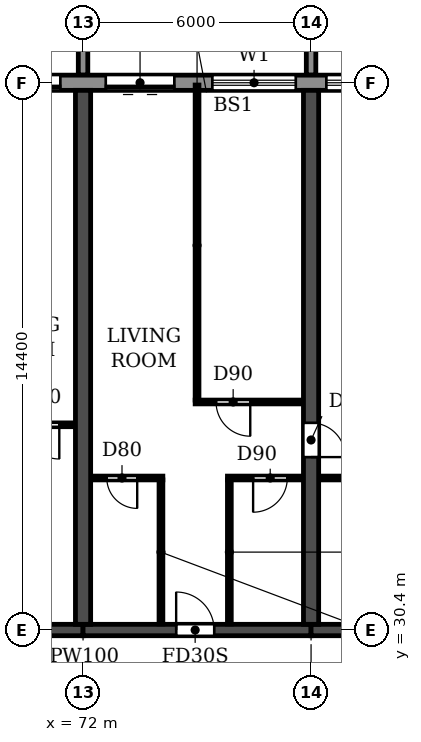
"""IFC4 building model, lengths in metres.
Left out: names, types, materials, properties, quantities, classifications, styles, units other than length and angle.
Written with IfcOpenShell. Run it as: python <this file> out.ifc"""

import sys

from ifc_helpers import new_model, si_unit, direction, frame, frame_2d, origin, place, context, subcontext, project, spatial, polyline, rectangle, outline, extrude, source, transform, mapped, element, fill, save


model = new_model("IFC4")
c1 = context("Model", 3, precision=1e-05, world=origin(), true_north=direction((0.0, 1.0)))
c2 = subcontext(c1, "Body", "Model", "MODEL_VIEW")
j1 = project(units=[si_unit("LENGTHUNIT", "METRE"), si_unit("PLANEANGLEUNIT", "RADIAN")], contexts=[c1])
p1 = place(None, origin())
s1 = spatial("IfcSite", under=j1, at=p1, CompositionType="ELEMENT")
p2 = place(p1, origin())
s2 = spatial("IfcBuilding", under=s1, at=p2, CompositionType="ELEMENT")
p3 = place(p2, frame((0.0, 0.0, 49.8)))
s3 = spatial("IfcBuildingStorey", under=s2, at=p3, CompositionType="ELEMENT", Elevation=49.8)
p4 = place(p3, frame((72.0, 30.55, 0.0), z_axis=(0.0, 0.0, 1.0), x_axis=(0.0, 1.0, 0.0)))
e1 = element("IfcWall", 1, at=p4, inside=s3, PredefinedType="SHEAR", context=c2, shape_type="SweptSolid", body=[
    extrude(rectangle(XDim=14.05, YDim=0.4, at=frame_2d((7.025, 0.0))), origin(), (0.0, 0.0, 1.0), 3.0),
])
p5 = place(p3, frame((78.0, 30.55, 0.0), z_axis=(0.0, 0.0, 1.0), x_axis=(0.0, 1.0, 0.0)))
e2 = element("IfcWall", 2, at=p5, inside=s3, PredefinedType="SHEAR", context=c2, shape_type="SweptSolid", body=[
    extrude(rectangle(XDim=14.05, YDim=0.4, at=frame_2d((7.025, 0.0))), origin(), (0.0, 0.0, 1.0), 3.0),
])
p6 = place(p5, frame((4.4, 0.0, 0.0)))
e3 = element("IfcOpeningElement", 3, at=p6, cuts=e2, PredefinedType="OPENING", context=c2, shape_type="SweptSolid", body=[
    extrude(rectangle(XDim=0.9, YDim=2.1, at=frame_2d((0.45, 1.05))), frame((0.0, 0.21, 0.0), z_axis=(0.0, -1.0, 0.0), x_axis=(1.0, 0.0, 0.0)), (0.0, 0.0, 1.0), 0.42),
])
p7 = place(p3, frame((66.0, 30.4, 0.0), z_axis=(0.0, 0.0, 1.0), x_axis=(1.0, 0.0, 0.0)))
e4 = element("IfcWall", 4, at=p7, inside=s3, PredefinedType="SHEAR", context=c2, shape_type="SweptSolid", body=[
    extrude(rectangle(XDim=6.0, YDim=0.3, at=frame_2d((3.0, 0.0))), origin(), (0.0, 0.0, 1.0), 2.4),
])
p8 = place(p7, frame((2.45, 0.0, 0.0)))
e5 = element("IfcOpeningElement", 5, at=p8, cuts=e4, PredefinedType="OPENING", context=c2, shape_type="SweptSolid", body=[
    extrude(rectangle(XDim=1.0, YDim=2.1, at=frame_2d((0.5, 1.05))), frame((0.0, 0.16, 0.0), z_axis=(0.0, -1.0, 0.0), x_axis=(1.0, 0.0, 0.0)), (0.0, 0.0, 1.0), 0.32),
])
p9 = place(p3, frame((72.0, 30.4, 0.0), z_axis=(0.0, 0.0, 1.0), x_axis=(1.0, 0.0, 0.0)))
e6 = element("IfcWall", 6, at=p9, inside=s3, PredefinedType="SHEAR", context=c2, shape_type="SweptSolid", body=[
    extrude(rectangle(XDim=6.0, YDim=0.3, at=frame_2d((3.0, 0.0))), origin(), (0.0, 0.0, 1.0), 2.4),
])
p10 = place(p9, frame((2.45, 0.0, 0.0)))
e7 = element("IfcOpeningElement", 7, at=p10, cuts=e6, PredefinedType="OPENING", context=c2, shape_type="SweptSolid", body=[
    extrude(rectangle(XDim=1.0, YDim=2.1, at=frame_2d((0.5, 1.05))), frame((0.0, 0.16, 0.0), z_axis=(0.0, -1.0, 0.0), x_axis=(1.0, 0.0, 0.0)), (0.0, 0.0, 1.0), 0.32),
])
p11 = place(p3, frame((78.0, 30.4, 0.0), z_axis=(0.0, 0.0, 1.0), x_axis=(1.0, 0.0, 0.0)))
e8 = element("IfcWall", 8, at=p11, inside=s3, PredefinedType="SHEAR", context=c2, shape_type="SweptSolid", body=[
    extrude(rectangle(XDim=6.0, YDim=0.3, at=frame_2d((3.0, 0.0))), origin(), (0.0, 0.0, 1.0), 2.4),
])
p12 = place(p3, frame((97.317, 44.8, 0.0), z_axis=(0.0, 0.0, 1.0), x_axis=(-1.0, 0.0, 0.0)))
e9 = element("IfcWall", 9, at=p12, inside=s3, PredefinedType="STANDARD", context=c2, shape_type="SweptSolid", body=[
    extrude(rectangle(XDim=92.634, YDim=0.4, at=frame_2d((46.317, 0.0))), origin(), (0.0, 0.0, 1.0), 3.0),
])
p13 = place(p12, frame((88.917, 0.0, 0.0)))
e10 = element("IfcOpeningElement", 10, at=p13, cuts=e9, PredefinedType="OPENING", context=c2, shape_type="SweptSolid", body=[
    extrude(rectangle(XDim=1.8, YDim=2.4, at=frame_2d((0.9, 1.2))), frame((0.0, 0.21, 0.0), z_axis=(0.0, -1.0, 0.0), x_axis=(1.0, 0.0, 0.0)), (0.0, 0.0, 1.0), 0.42),
])
p14 = place(p12, frame((85.717, 0.0, 0.9)))
e11 = element("IfcOpeningElement", 11, at=p14, cuts=e9, PredefinedType="OPENING", context=c2, shape_type="SweptSolid", body=[
    extrude(rectangle(XDim=2.2, YDim=1.5, at=frame_2d((1.1, 0.75))), frame((0.0, 0.21, 0.0), z_axis=(0.0, -1.0, 0.0), x_axis=(1.0, 0.0, 0.0)), (0.0, 0.0, 1.0), 0.42),
])
p15 = place(p12, frame((82.717, 0.0, 0.9)))
e12 = element("IfcOpeningElement", 12, at=p15, cuts=e9, PredefinedType="OPENING", context=c2, shape_type="SweptSolid", body=[
    extrude(rectangle(XDim=2.2, YDim=1.5, at=frame_2d((1.1, 0.75))), frame((0.0, 0.21, 0.0), z_axis=(0.0, -1.0, 0.0), x_axis=(1.0, 0.0, 0.0)), (0.0, 0.0, 1.0), 0.42),
])
p16 = place(p12, frame((79.717, 0.0, 0.9)))
e13 = element("IfcOpeningElement", 13, at=p16, cuts=e9, PredefinedType="OPENING", context=c2, shape_type="SweptSolid", body=[
    extrude(rectangle(XDim=2.2, YDim=1.5, at=frame_2d((1.1, 0.75))), frame((0.0, 0.21, 0.0), z_axis=(0.0, -1.0, 0.0), x_axis=(1.0, 0.0, 0.0)), (0.0, 0.0, 1.0), 0.42),
])
p17 = place(p12, frame((76.717, 0.0, 0.9)))
e14 = element("IfcOpeningElement", 14, at=p17, cuts=e9, PredefinedType="OPENING", context=c2, shape_type="SweptSolid", body=[
    extrude(rectangle(XDim=2.2, YDim=1.5, at=frame_2d((1.1, 0.75))), frame((0.0, 0.21, 0.0), z_axis=(0.0, -1.0, 0.0), x_axis=(1.0, 0.0, 0.0)), (0.0, 0.0, 1.0), 0.42),
])
p18 = place(p12, frame((73.917, 0.0, 0.0)))
e15 = element("IfcOpeningElement", 15, at=p18, cuts=e9, PredefinedType="OPENING", context=c2, shape_type="SweptSolid", body=[
    extrude(rectangle(XDim=1.8, YDim=2.4, at=frame_2d((0.9, 1.2))), frame((0.0, 0.21, 0.0), z_axis=(0.0, -1.0, 0.0), x_axis=(1.0, 0.0, 0.0)), (0.0, 0.0, 1.0), 0.42),
])
p19 = place(p12, frame((70.717, 0.0, 0.9)))
e16 = element("IfcOpeningElement", 16, at=p19, cuts=e9, PredefinedType="OPENING", context=c2, shape_type="SweptSolid", body=[
    extrude(rectangle(XDim=2.2, YDim=1.5, at=frame_2d((1.1, 0.75))), frame((0.0, 0.21, 0.0), z_axis=(0.0, -1.0, 0.0), x_axis=(1.0, 0.0, 0.0)), (0.0, 0.0, 1.0), 0.42),
])
p20 = place(p12, frame((67.717, 0.0, 0.9)))
e17 = element("IfcOpeningElement", 17, at=p20, cuts=e9, PredefinedType="OPENING", context=c2, shape_type="SweptSolid", body=[
    extrude(rectangle(XDim=2.2, YDim=1.5, at=frame_2d((1.1, 0.75))), frame((0.0, 0.21, 0.0), z_axis=(0.0, -1.0, 0.0), x_axis=(1.0, 0.0, 0.0)), (0.0, 0.0, 1.0), 0.42),
])
p21 = place(p12, frame((64.717, 0.0, 0.9)))
e18 = element("IfcOpeningElement", 18, at=p21, cuts=e9, PredefinedType="OPENING", context=c2, shape_type="SweptSolid", body=[
    extrude(rectangle(XDim=2.2, YDim=1.5, at=frame_2d((1.1, 0.75))), frame((0.0, 0.21, 0.0), z_axis=(0.0, -1.0, 0.0), x_axis=(1.0, 0.0, 0.0)), (0.0, 0.0, 1.0), 0.42),
])
p22 = place(p12, frame((61.917, 0.0, 0.0)))
e19 = element("IfcOpeningElement", 19, at=p22, cuts=e9, PredefinedType="OPENING", context=c2, shape_type="SweptSolid", body=[
    extrude(rectangle(XDim=1.8, YDim=2.4, at=frame_2d((0.9, 1.2))), frame((0.0, 0.21, 0.0), z_axis=(0.0, -1.0, 0.0), x_axis=(1.0, 0.0, 0.0)), (0.0, 0.0, 1.0), 0.42),
])
p23 = place(p12, frame((58.717, 0.0, 0.9)))
e20 = element("IfcOpeningElement", 20, at=p23, cuts=e9, PredefinedType="OPENING", context=c2, shape_type="SweptSolid", body=[
    extrude(rectangle(XDim=2.2, YDim=1.5, at=frame_2d((1.1, 0.75))), frame((0.0, 0.21, 0.0), z_axis=(0.0, -1.0, 0.0), x_axis=(1.0, 0.0, 0.0)), (0.0, 0.0, 1.0), 0.42),
])
p24 = place(p12, frame((55.717, 0.0, 0.9)))
e21 = element("IfcOpeningElement", 21, at=p24, cuts=e9, PredefinedType="OPENING", context=c2, shape_type="SweptSolid", body=[
    extrude(rectangle(XDim=2.2, YDim=1.5, at=frame_2d((1.1, 0.75))), frame((0.0, 0.21, 0.0), z_axis=(0.0, -1.0, 0.0), x_axis=(1.0, 0.0, 0.0)), (0.0, 0.0, 1.0), 0.42),
])
p25 = place(p12, frame((52.717, 0.0, 0.9)))
e22 = element("IfcOpeningElement", 22, at=p25, cuts=e9, PredefinedType="OPENING", context=c2, shape_type="SweptSolid", body=[
    extrude(rectangle(XDim=2.2, YDim=1.5, at=frame_2d((1.1, 0.75))), frame((0.0, 0.21, 0.0), z_axis=(0.0, -1.0, 0.0), x_axis=(1.0, 0.0, 0.0)), (0.0, 0.0, 1.0), 0.42),
])
p26 = place(p12, frame((49.917, 0.0, 0.0)))
e23 = element("IfcOpeningElement", 23, at=p26, cuts=e9, PredefinedType="OPENING", context=c2, shape_type="SweptSolid", body=[
    extrude(rectangle(XDim=1.8, YDim=2.4, at=frame_2d((0.9, 1.2))), frame((0.0, 0.21, 0.0), z_axis=(0.0, -1.0, 0.0), x_axis=(1.0, 0.0, 0.0)), (0.0, 0.0, 1.0), 0.42),
])
p27 = place(p12, frame((46.717, 0.0, 0.9)))
e24 = element("IfcOpeningElement", 24, at=p27, cuts=e9, PredefinedType="OPENING", context=c2, shape_type="SweptSolid", body=[
    extrude(rectangle(XDim=2.2, YDim=1.5, at=frame_2d((1.1, 0.75))), frame((0.0, 0.21, 0.0), z_axis=(0.0, -1.0, 0.0), x_axis=(1.0, 0.0, 0.0)), (0.0, 0.0, 1.0), 0.42),
])
p28 = place(p12, frame((43.717, 0.0, 0.9)))
e25 = element("IfcOpeningElement", 25, at=p28, cuts=e9, PredefinedType="OPENING", context=c2, shape_type="SweptSolid", body=[
    extrude(rectangle(XDim=2.2, YDim=1.5, at=frame_2d((1.1, 0.75))), frame((0.0, 0.21, 0.0), z_axis=(0.0, -1.0, 0.0), x_axis=(1.0, 0.0, 0.0)), (0.0, 0.0, 1.0), 0.42),
])
p29 = place(p12, frame((40.717, 0.0, 0.9)))
e26 = element("IfcOpeningElement", 26, at=p29, cuts=e9, PredefinedType="OPENING", context=c2, shape_type="SweptSolid", body=[
    extrude(rectangle(XDim=2.2, YDim=1.5, at=frame_2d((1.1, 0.75))), frame((0.0, 0.21, 0.0), z_axis=(0.0, -1.0, 0.0), x_axis=(1.0, 0.0, 0.0)), (0.0, 0.0, 1.0), 0.42),
])
p30 = place(p12, frame((37.917, 0.0, 0.0)))
e27 = element("IfcOpeningElement", 27, at=p30, cuts=e9, PredefinedType="OPENING", context=c2, shape_type="SweptSolid", body=[
    extrude(rectangle(XDim=1.8, YDim=2.4, at=frame_2d((0.9, 1.2))), frame((0.0, 0.21, 0.0), z_axis=(0.0, -1.0, 0.0), x_axis=(1.0, 0.0, 0.0)), (0.0, 0.0, 1.0), 0.42),
])
p31 = place(p12, frame((34.717, 0.0, 0.9)))
e28 = element("IfcOpeningElement", 28, at=p31, cuts=e9, PredefinedType="OPENING", context=c2, shape_type="SweptSolid", body=[
    extrude(rectangle(XDim=2.2, YDim=1.5, at=frame_2d((1.1, 0.75))), frame((0.0, 0.21, 0.0), z_axis=(0.0, -1.0, 0.0), x_axis=(1.0, 0.0, 0.0)), (0.0, 0.0, 1.0), 0.42),
])
p32 = place(p12, frame((31.717, 0.0, 0.9)))
e29 = element("IfcOpeningElement", 29, at=p32, cuts=e9, PredefinedType="OPENING", context=c2, shape_type="SweptSolid", body=[
    extrude(rectangle(XDim=2.2, YDim=1.5, at=frame_2d((1.1, 0.75))), frame((0.0, 0.21, 0.0), z_axis=(0.0, -1.0, 0.0), x_axis=(1.0, 0.0, 0.0)), (0.0, 0.0, 1.0), 0.42),
])
p33 = place(p12, frame((28.717, 0.0, 0.9)))
e30 = element("IfcOpeningElement", 30, at=p33, cuts=e9, PredefinedType="OPENING", context=c2, shape_type="SweptSolid", body=[
    extrude(rectangle(XDim=2.2, YDim=1.5, at=frame_2d((1.1, 0.75))), frame((0.0, 0.21, 0.0), z_axis=(0.0, -1.0, 0.0), x_axis=(1.0, 0.0, 0.0)), (0.0, 0.0, 1.0), 0.42),
])
p34 = place(p12, frame((25.917, 0.0, 0.0)))
e31 = element("IfcOpeningElement", 31, at=p34, cuts=e9, PredefinedType="OPENING", context=c2, shape_type="SweptSolid", body=[
    extrude(rectangle(XDim=1.8, YDim=2.4, at=frame_2d((0.9, 1.2))), frame((0.0, 0.21, 0.0), z_axis=(0.0, -1.0, 0.0), x_axis=(1.0, 0.0, 0.0)), (0.0, 0.0, 1.0), 0.42),
])
p35 = place(p12, frame((22.917, 0.0, 0.0)))
e32 = element("IfcOpeningElement", 32, at=p35, cuts=e9, PredefinedType="OPENING", context=c2, shape_type="SweptSolid", body=[
    extrude(rectangle(XDim=1.8, YDim=2.4, at=frame_2d((0.9, 1.2))), frame((0.0, 0.21, 0.0), z_axis=(0.0, -1.0, 0.0), x_axis=(1.0, 0.0, 0.0)), (0.0, 0.0, 1.0), 0.42),
])
p36 = place(p12, frame((19.717, 0.0, 0.9)))
e33 = element("IfcOpeningElement", 33, at=p36, cuts=e9, PredefinedType="OPENING", context=c2, shape_type="SweptSolid", body=[
    extrude(rectangle(XDim=2.2, YDim=1.5, at=frame_2d((1.1, 0.75))), frame((0.0, 0.21, 0.0), z_axis=(0.0, -1.0, 0.0), x_axis=(1.0, 0.0, 0.0)), (0.0, 0.0, 1.0), 0.42),
])
p37 = place(p12, frame((16.717, 0.0, 0.9)))
e34 = element("IfcOpeningElement", 34, at=p37, cuts=e9, PredefinedType="OPENING", context=c2, shape_type="SweptSolid", body=[
    extrude(rectangle(XDim=2.2, YDim=1.5, at=frame_2d((1.1, 0.75))), frame((0.0, 0.21, 0.0), z_axis=(0.0, -1.0, 0.0), x_axis=(1.0, 0.0, 0.0)), (0.0, 0.0, 1.0), 0.42),
])
p38 = place(p12, frame((13.717, 0.0, 0.9)))
e35 = element("IfcOpeningElement", 35, at=p38, cuts=e9, PredefinedType="OPENING", context=c2, shape_type="SweptSolid", body=[
    extrude(rectangle(XDim=2.2, YDim=1.5, at=frame_2d((1.1, 0.75))), frame((0.0, 0.21, 0.0), z_axis=(0.0, -1.0, 0.0), x_axis=(1.0, 0.0, 0.0)), (0.0, 0.0, 1.0), 0.42),
])
p39 = place(p12, frame((10.717, 0.0, 0.9)))
e36 = element("IfcOpeningElement", 36, at=p39, cuts=e9, PredefinedType="OPENING", context=c2, shape_type="SweptSolid", body=[
    extrude(rectangle(XDim=2.2, YDim=1.5, at=frame_2d((1.1, 0.75))), frame((0.0, 0.21, 0.0), z_axis=(0.0, -1.0, 0.0), x_axis=(1.0, 0.0, 0.0)), (0.0, 0.0, 1.0), 0.42),
])
p40 = place(p12, frame((7.917, 0.0, 0.0)))
e37 = element("IfcOpeningElement", 37, at=p40, cuts=e9, PredefinedType="OPENING", context=c2, shape_type="SweptSolid", body=[
    extrude(rectangle(XDim=1.8, YDim=2.4, at=frame_2d((0.9, 1.2))), frame((0.0, 0.21, 0.0), z_axis=(0.0, -1.0, 0.0), x_axis=(1.0, 0.0, 0.0)), (0.0, 0.0, 1.0), 0.42),
])
p41 = place(p12, frame((4.717, 0.0, 0.9)))
e38 = element("IfcOpeningElement", 38, at=p41, cuts=e9, PredefinedType="OPENING", context=c2, shape_type="SweptSolid", body=[
    extrude(rectangle(XDim=2.2, YDim=1.5, at=frame_2d((1.1, 0.75))), frame((0.0, 0.21, 0.0), z_axis=(0.0, -1.0, 0.0), x_axis=(1.0, 0.0, 0.0)), (0.0, 0.0, 1.0), 0.42),
])
p42 = place(p12, frame((1.917, 0.0, 0.0)))
e39 = element("IfcOpeningElement", 39, at=p42, cuts=e9, PredefinedType="OPENING", context=c2, shape_type="SweptSolid", body=[
    extrude(rectangle(XDim=1.8, YDim=2.4, at=frame_2d((0.9, 1.2))), frame((0.0, 0.21, 0.0), z_axis=(0.0, -1.0, 0.0), x_axis=(1.0, 0.0, 0.0)), (0.0, 0.0, 1.0), 0.42),
])
m1 = source(origin(), c2, "Body", "SweptSolid", [
    extrude(outline(polyline([(0.0, 0.0), (0.25, 0.0), (0.25, 3.1), (0.0, 3.1), (0.0, 0.0)])), origin(), (0.0, 0.0, 1.0), 3.1),
])
for number, where in (
    (40, (71.875, 45.0, 0.0)),
    (41, (77.875, 45.0, 0.0)),
):
    element("IfcWall", number, at=place(p3, frame(where)), inside=s3, PredefinedType="STANDARD", context=c2, shape_type="MappedRepresentation", body=[
        mapped(m1, transform((0.0, 0.0, 0.0))),
    ])
p43 = place(p3, frame((72.21, 34.4, 0.0), z_axis=(0.0, 0.0, 1.0), x_axis=(1.0, 0.0, 0.0)))
e42 = element("IfcWall", 42, at=p43, inside=s3, PredefinedType="PARTITIONING", context=c2, shape_type="SweptSolid", body=[
    extrude(rectangle(XDim=1.89, YDim=0.1, at=frame_2d((0.945, 0.0))), origin(), (0.0, 0.0, 1.0), 3.0),
])
p44 = place(p43, frame((0.415, 0.0, 0.0)))
e43 = element("IfcOpeningElement", 43, at=p44, cuts=e42, PredefinedType="OPENING", context=c2, shape_type="SweptSolid", body=[
    extrude(rectangle(XDim=0.8, YDim=2.1, at=frame_2d((0.4, 1.05))), frame((0.0, 0.06, 0.0), z_axis=(0.0, -1.0, 0.0), x_axis=(1.0, 0.0, 0.0)), (0.0, 0.0, 1.0), 0.12),
])
p45 = place(p3, frame((75.8, 34.4, 0.0), z_axis=(0.0, 0.0, 1.0), x_axis=(1.0, 0.0, 0.0)))
e44 = element("IfcWall", 44, at=p45, inside=s3, PredefinedType="PARTITIONING", context=c2, shape_type="SweptSolid", body=[
    extrude(rectangle(XDim=1.99, YDim=0.1, at=frame_2d((0.995, 0.0))), origin(), (0.0, 0.0, 1.0), 3.0),
])
p46 = place(p45, frame((0.675, 0.0, 0.0)))
e45 = element("IfcOpeningElement", 45, at=p46, cuts=e44, PredefinedType="OPENING", context=c2, shape_type="SweptSolid", body=[
    extrude(rectangle(XDim=0.9, YDim=2.1, at=frame_2d((0.45, 1.05))), frame((0.0, 0.06, 0.0), z_axis=(0.0, -1.0, 0.0), x_axis=(1.0, 0.0, 0.0)), (0.0, 0.0, 1.0), 0.12),
])
p47 = place(p3, frame((78.21, 34.4, 0.0), z_axis=(0.0, 0.0, 1.0), x_axis=(1.0, 0.0, 0.0)))
e46 = element("IfcWall", 46, at=p47, inside=s3, PredefinedType="PARTITIONING", context=c2, shape_type="SweptSolid", body=[
    extrude(rectangle(XDim=2.69, YDim=0.1, at=frame_2d((1.345, 0.0))), origin(), (0.0, 0.0, 1.0), 3.0),
])
p48 = place(p47, frame((0.89, 0.0, 0.0)))
e47 = element("IfcOpeningElement", 47, at=p48, cuts=e46, PredefinedType="OPENING", context=c2, shape_type="SweptSolid", body=[
    extrude(rectangle(XDim=0.8, YDim=2.1, at=frame_2d((0.4, 1.05))), frame((0.0, 0.06, 0.0), z_axis=(0.0, -1.0, 0.0), x_axis=(1.0, 0.0, 0.0)), (0.0, 0.0, 1.0), 0.12),
])
p49 = place(p3, frame((69.8, 35.8, 0.0), z_axis=(0.0, 0.0, 1.0), x_axis=(1.0, 0.0, 0.0)))
e48 = element("IfcWall", 48, at=p49, inside=s3, PredefinedType="PARTITIONING", context=c2, shape_type="SweptSolid", body=[
    extrude(rectangle(XDim=1.99, YDim=0.1, at=frame_2d((0.995, 0.0))), origin(), (0.0, 0.0, 1.0), 3.0),
])
p50 = place(p49, frame((0.675, 0.0, 0.0)))
e49 = element("IfcOpeningElement", 49, at=p50, cuts=e48, PredefinedType="OPENING", context=c2, shape_type="SweptSolid", body=[
    extrude(rectangle(XDim=0.9, YDim=2.1, at=frame_2d((0.45, 1.05))), frame((0.0, 0.06, 0.0), z_axis=(0.0, -1.0, 0.0), x_axis=(1.0, 0.0, 0.0)), (0.0, 0.0, 1.0), 0.12),
])
p51 = place(p3, frame((74.95, 36.4, 0.0), z_axis=(0.0, 0.0, 1.0), x_axis=(1.0, 0.0, 0.0)))
e50 = element("IfcWall", 50, at=p51, inside=s3, PredefinedType="PARTITIONING", context=c2, shape_type="SweptSolid", body=[
    extrude(rectangle(XDim=2.84, YDim=0.1, at=frame_2d((1.42, 0.0))), origin(), (0.0, 0.0, 1.0), 3.0),
])
p52 = place(p51, frame((0.55, 0.0, 0.0)))
e51 = element("IfcOpeningElement", 51, at=p52, cuts=e50, PredefinedType="OPENING", context=c2, shape_type="SweptSolid", body=[
    extrude(rectangle(XDim=0.9, YDim=2.1, at=frame_2d((0.45, 1.05))), frame((0.0, 0.06, 0.0), z_axis=(0.0, -1.0, 0.0), x_axis=(1.0, 0.0, 0.0)), (0.0, 0.0, 1.0), 0.12),
])
p53 = place(p3, frame((74.05, 30.56, 0.0), z_axis=(0.0, 0.0, 1.0), x_axis=(0.0, 1.0, 0.0)))
e52 = element("IfcWall", 52, at=p53, inside=s3, PredefinedType="PARTITIONING", context=c2, shape_type="SweptSolid", body=[
    extrude(rectangle(XDim=3.79, YDim=0.1, at=frame_2d((1.895, 0.0))), origin(), (0.0, 0.0, 1.0), 3.0),
])
p54 = place(p3, frame((75.0, 36.45, 0.0), z_axis=(0.0, 0.0, 1.0), x_axis=(0.0, 1.0, 0.0)))
e53 = element("IfcWall", 53, at=p54, inside=s3, PredefinedType="PARTITIONING", context=c2, shape_type="SweptSolid", body=[
    extrude(rectangle(XDim=8.29, YDim=0.1, at=frame_2d((4.145, 0.0))), origin(), (0.0, 0.0, 1.0), 3.0),
])
p55 = place(p3, frame((75.85, 30.56, 0.0), z_axis=(0.0, 0.0, 1.0), x_axis=(0.0, 1.0, 0.0)))
e54 = element("IfcWall", 54, at=p55, inside=s3, PredefinedType="PARTITIONING", context=c2, shape_type="SweptSolid", body=[
    extrude(rectangle(XDim=3.79, YDim=0.1, at=frame_2d((1.895, 0.0))), origin(), (0.0, 0.0, 1.0), 3.0),
])
p56 = place(p34, origin())
e55 = element("IfcDoor", 55, at=p56, inside=s3, OperationType="DOUBLE_DOOR_SLIDING", PredefinedType="DOOR", context=c2, shape_type="SweptSolid", body=[
    extrude(rectangle(XDim=1.8, YDim=2.4, at=frame_2d((0.9, 1.2))), frame((0.0, 0.025, 0.0), z_axis=(0.0, -1.0, 0.0), x_axis=(1.0, 0.0, 0.0)), (0.0, 0.0, 1.0), 0.05),
])
fill(e31, e55)
p57 = place(p35, origin())
e56 = element("IfcDoor", 56, at=p57, inside=s3, OperationType="DOUBLE_DOOR_SLIDING", PredefinedType="DOOR", context=c2, shape_type="SweptSolid", body=[
    extrude(rectangle(XDim=1.8, YDim=2.4, at=frame_2d((0.9, 1.2))), frame((0.0, 0.025, 0.0), z_axis=(0.0, -1.0, 0.0), x_axis=(1.0, 0.0, 0.0)), (0.0, 0.0, 1.0), 0.05),
])
fill(e32, e56)
p58 = place(p36, origin())
e57 = element("IfcWindow", 57, at=p58, inside=s3, PartitioningType="DOUBLE_PANEL_HORIZONTAL", PredefinedType="WINDOW", context=c2, shape_type="SweptSolid", body=[
    extrude(rectangle(XDim=2.2, YDim=1.5, at=frame_2d((1.1, 0.75))), frame((0.0, 0.03, 0.0), z_axis=(0.0, -1.0, 0.0), x_axis=(1.0, 0.0, 0.0)), (0.0, 0.0, 1.0), 0.06),
])
fill(e33, e57)
p59 = place(p37, origin())
e58 = element("IfcWindow", 58, at=p59, inside=s3, PartitioningType="DOUBLE_PANEL_HORIZONTAL", PredefinedType="WINDOW", context=c2, shape_type="SweptSolid", body=[
    extrude(rectangle(XDim=2.2, YDim=1.5, at=frame_2d((1.1, 0.75))), frame((0.0, 0.03, 0.0), z_axis=(0.0, -1.0, 0.0), x_axis=(1.0, 0.0, 0.0)), (0.0, 0.0, 1.0), 0.06),
])
fill(e34, e58)
p60 = place(p50, frame((0.9, 0.0, 0.0), z_axis=(0.0, 0.0, 1.0), x_axis=(-1.0, 0.0, 0.0)))
e59 = element("IfcDoor", 59, at=p60, inside=s3, OperationType="SINGLE_SWING_LEFT", PredefinedType="DOOR", context=c2, shape_type="SweptSolid", body=[
    extrude(rectangle(XDim=0.9, YDim=2.1, at=frame_2d((0.45, 1.05))), frame((0.0, 0.025, 0.0), z_axis=(0.0, -1.0, 0.0), x_axis=(1.0, 0.0, 0.0)), (0.0, 0.0, 1.0), 0.05),
])
fill(e49, e59)
p61 = place(p44, frame((0.8, 0.0, 0.0), z_axis=(0.0, 0.0, 1.0), x_axis=(-1.0, 0.0, 0.0)))
e60 = element("IfcDoor", 60, at=p61, inside=s3, OperationType="SINGLE_SWING_LEFT", PredefinedType="DOOR", context=c2, shape_type="SweptSolid", body=[
    extrude(rectangle(XDim=0.8, YDim=2.1, at=frame_2d((0.4, 1.05))), frame((0.0, 0.025, 0.0), z_axis=(0.0, -1.0, 0.0), x_axis=(1.0, 0.0, 0.0)), (0.0, 0.0, 1.0), 0.05),
])
fill(e43, e60)
p62 = place(p10, origin())
e61 = element("IfcDoor", 61, at=p62, inside=s3, OperationType="SINGLE_SWING_LEFT", PredefinedType="DOOR", context=c2, shape_type="SweptSolid", body=[
    extrude(rectangle(XDim=1.0, YDim=2.1, at=frame_2d((0.5, 1.05))), frame((0.0, 0.025, 0.0), z_axis=(0.0, -1.0, 0.0), x_axis=(1.0, 0.0, 0.0)), (0.0, 0.0, 1.0), 0.05),
])
fill(e7, e61)
p63 = place(p52, frame((0.9, 0.0, 0.0), z_axis=(0.0, 0.0, 1.0), x_axis=(-1.0, 0.0, 0.0)))
e62 = element("IfcDoor", 62, at=p63, inside=s3, OperationType="SINGLE_SWING_LEFT", PredefinedType="DOOR", context=c2, shape_type="SweptSolid", body=[
    extrude(rectangle(XDim=0.9, YDim=2.1, at=frame_2d((0.45, 1.05))), frame((0.0, 0.025, 0.0), z_axis=(0.0, -1.0, 0.0), x_axis=(1.0, 0.0, 0.0)), (0.0, 0.0, 1.0), 0.05),
])
fill(e51, e62)
p64 = place(p46, frame((0.9, 0.0, 0.0), z_axis=(0.0, 0.0, 1.0), x_axis=(-1.0, 0.0, 0.0)))
e63 = element("IfcDoor", 63, at=p64, inside=s3, OperationType="SINGLE_SWING_RIGHT", PredefinedType="DOOR", context=c2, shape_type="SweptSolid", body=[
    extrude(rectangle(XDim=0.9, YDim=2.1, at=frame_2d((0.45, 1.05))), frame((0.0, 0.025, 0.0), z_axis=(0.0, -1.0, 0.0), x_axis=(1.0, 0.0, 0.0)), (0.0, 0.0, 1.0), 0.05),
])
fill(e45, e63)
p65 = place(p6, frame((0.9, 0.0, 0.0), z_axis=(0.0, 0.0, 1.0), x_axis=(-1.0, 0.0, 0.0)))
e64 = element("IfcDoor", 64, at=p65, inside=s3, OperationType="SINGLE_SWING_RIGHT", PredefinedType="DOOR", context=c2, shape_type="SweptSolid", body=[
    extrude(rectangle(XDim=0.9, YDim=2.1, at=frame_2d((0.45, 1.05))), frame((0.0, 0.025, 0.0), z_axis=(0.0, -1.0, 0.0), x_axis=(1.0, 0.0, 0.0)), (0.0, 0.0, 1.0), 0.05),
])
fill(e3, e64)
save(model, sys.argv[1])
